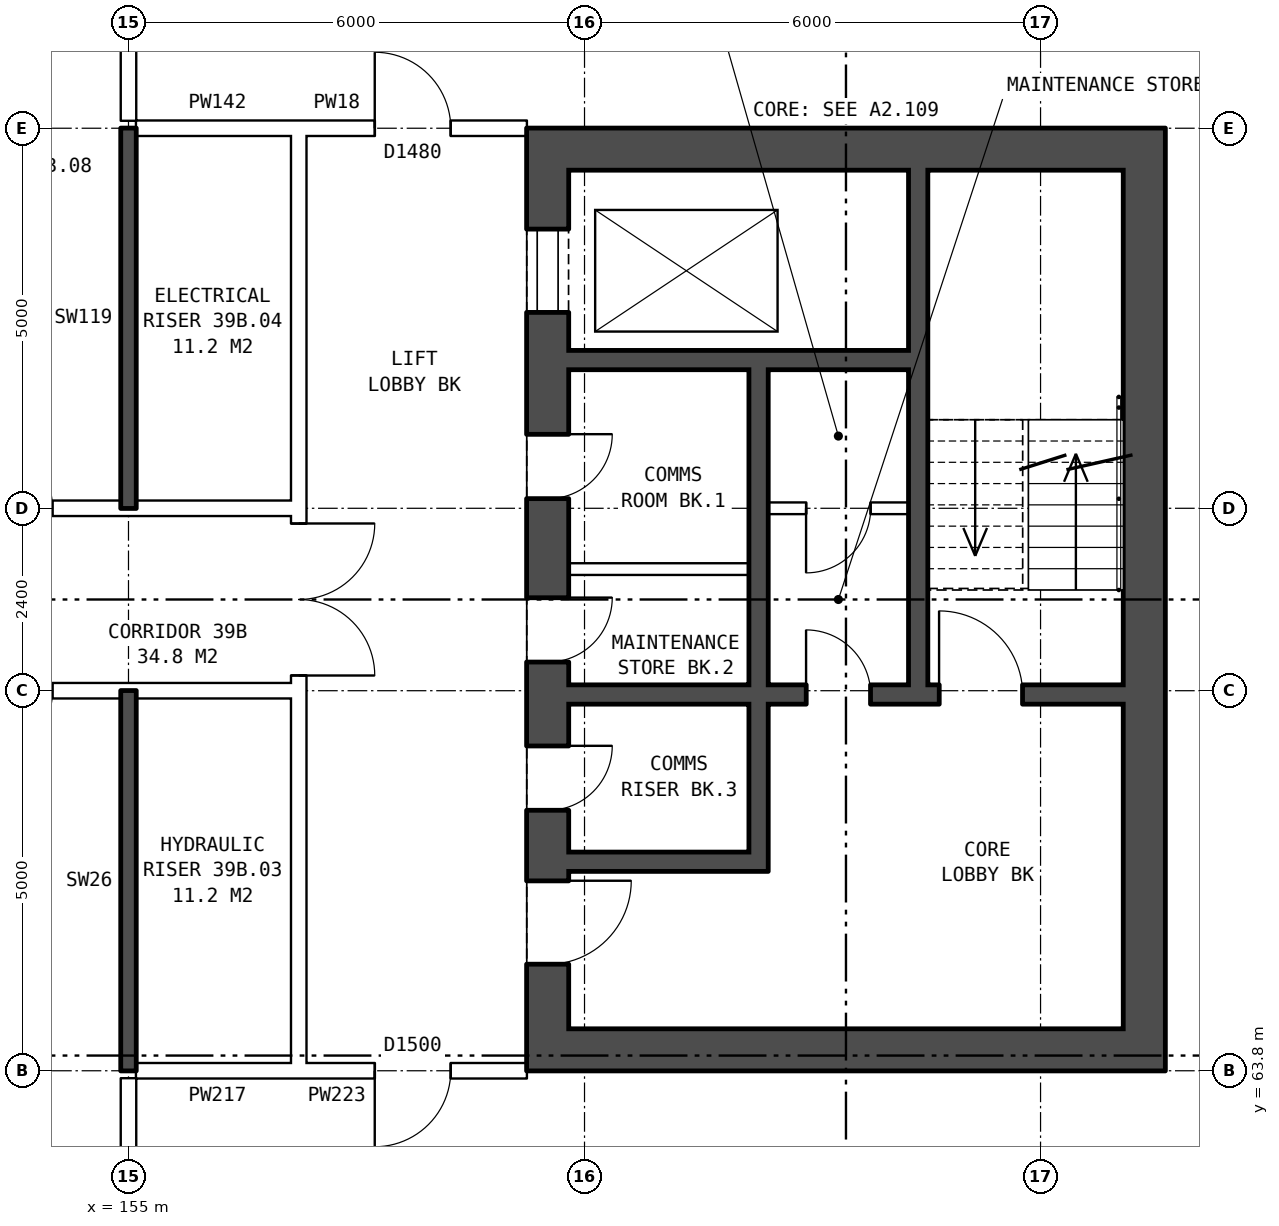
"""IFC4 building model, lengths in metres.
Left out: names, types, materials, properties, quantities, classifications, styles, units other than length and angle.
Written with IfcOpenShell. Run it as: python <this file> out.ifc"""

import sys

from ifc_helpers import new_model, si_unit, direction, frame, frame_2d, origin, place, context, subcontext, project, spatial, rectangle, extrude, element, fill, save


model = new_model("IFC4")
c1 = context("Model", 3, precision=1e-05, world=origin(), true_north=direction((0.0, 1.0)))
c2 = subcontext(c1, "Body", "Model", "MODEL_VIEW")
j1 = project(units=[si_unit("LENGTHUNIT", "METRE"), si_unit("PLANEANGLEUNIT", "RADIAN")], contexts=[c1])
p1 = place(None, origin())
s1 = spatial("IfcSite", under=j1, at=p1, CompositionType="ELEMENT")
p2 = place(p1, origin())
s2 = spatial("IfcBuilding", under=s1, at=p2, CompositionType="ELEMENT")
p3 = place(p2, frame((0.0, 0.0, 139.2)))
s3 = spatial("IfcBuildingStorey", under=s2, at=p3, CompositionType="ELEMENT", Elevation=139.2)
p4 = place(p3, frame((160.515, 76.2, 0.0), z_axis=(0.0, 0.0, 1.0), x_axis=(0.0, -1.0, 0.0)))
e1 = element("IfcWall", 1, at=p4, inside=s3, PredefinedType="SHEAR", context=c2, shape_type="SweptSolid", body=[
    extrude(rectangle(XDim=12.4, YDim=0.55, at=frame_2d((6.2, 0.0))), origin(), (0.0, 0.0, 1.0), 2.85),
])
p5 = place(p4, frame((1.325, 0.0, 0.0)))
e2 = element("IfcOpeningElement", 2, at=p5, cuts=e1, PredefinedType="OPENING", context=c2, shape_type="SweptSolid", body=[
    extrude(rectangle(XDim=1.1, YDim=2.1, at=frame_2d((0.55, 1.05))), frame((0.0, 0.285, 0.0), z_axis=(0.0, -1.0, 0.0), x_axis=(1.0, 0.0, 0.0)), (0.0, 0.0, 1.0), 0.57),
])
p6 = place(p4, frame((4.025, 0.0, 0.0)))
e3 = element("IfcOpeningElement", 3, at=p6, cuts=e1, PredefinedType="OPENING", context=c2, shape_type="SweptSolid", body=[
    extrude(rectangle(XDim=0.85, YDim=2.1, at=frame_2d((0.425, 1.05))), frame((0.0, 0.285, 0.0), z_axis=(0.0, -1.0, 0.0), x_axis=(1.0, 0.0, 0.0)), (0.0, 0.0, 1.0), 0.57),
])
p7 = place(p4, frame((6.175, 0.0, 0.0)))
e4 = element("IfcOpeningElement", 4, at=p7, cuts=e1, PredefinedType="OPENING", context=c2, shape_type="SweptSolid", body=[
    extrude(rectangle(XDim=0.85, YDim=2.1, at=frame_2d((0.425, 1.05))), frame((0.0, 0.285, 0.0), z_axis=(0.0, -1.0, 0.0), x_axis=(1.0, 0.0, 0.0)), (0.0, 0.0, 1.0), 0.57),
])
p8 = place(p4, frame((9.9, 0.0, 0.0)))
e5 = element("IfcOpeningElement", 5, at=p8, cuts=e1, PredefinedType="OPENING", context=c2, shape_type="SweptSolid", body=[
    extrude(rectangle(XDim=1.1, YDim=2.1, at=frame_2d((0.55, 1.05))), frame((0.0, 0.285, 0.0), z_axis=(0.0, -1.0, 0.0), x_axis=(1.0, 0.0, 0.0)), (0.0, 0.0, 1.0), 0.57),
])
p9 = place(p4, frame((8.125, 0.0, 0.0)))
e6 = element("IfcOpeningElement", 6, at=p9, cuts=e1, PredefinedType="OPENING", context=c2, shape_type="SweptSolid", body=[
    extrude(rectangle(XDim=0.85, YDim=2.1, at=frame_2d((0.425, 1.05))), frame((0.0, 0.285, 0.0), z_axis=(0.0, -1.0, 0.0), x_axis=(1.0, 0.0, 0.0)), (0.0, 0.0, 1.0), 0.57),
])
p10 = place(p3, frame((168.365, 76.2, 0.0), z_axis=(0.0, 0.0, 1.0), x_axis=(0.0, -1.0, 0.0)))
e7 = element("IfcWall", 7, at=p10, inside=s3, PredefinedType="SHEAR", context=c2, shape_type="SweptSolid", body=[
    extrude(rectangle(XDim=12.4, YDim=0.55, at=frame_2d((6.2, 0.0))), origin(), (0.0, 0.0, 1.0), 2.85),
])
for number, where, z_axis, x_axis in (
    (8, (160.79, 75.925, 0.0), (0.0, 0.0, 1.0), (1.0, 0.0, 0.0)),
    (9, (160.79, 64.075, 0.0), (0.0, 0.0, 1.0), (1.0, 0.0, 0.0)),
):
    element("IfcWall", number, at=place(p3, frame(where, z_axis=z_axis, x_axis=x_axis)), inside=s3, PredefinedType="SHEAR", context=c2, shape_type="SweptSolid", body=[
        extrude(rectangle(XDim=7.3, YDim=0.55, at=frame_2d((3.65, 0.0))), origin(), (0.0, 0.0, 1.0), 2.85),
    ])
p11 = place(p3, frame((160.79, 73.15, 0.0), z_axis=(0.0, 0.0, 1.0), x_axis=(1.0, 0.0, 0.0)))
e10 = element("IfcWall", 10, at=p11, inside=s3, PredefinedType="SHEAR", context=c2, shape_type="SweptSolid", body=[
    extrude(rectangle(XDim=4.475, YDim=0.25, at=frame_2d((2.237, 0.0))), origin(), (0.0, 0.0, 1.0), 2.85),
])
p12 = place(p3, frame((163.415, 71.2, 0.0), z_axis=(0.0, 0.0, 1.0), x_axis=(1.0, 0.0, 0.0)))
e11 = element("IfcWall", 11, at=p12, inside=s3, PredefinedType="PARTITIONING", context=c2, shape_type="SweptSolid", body=[
    extrude(rectangle(XDim=1.85, YDim=0.15, at=frame_2d((0.925, 0.0))), origin(), (0.0, 0.0, 1.0), 2.85),
])
p13 = place(p12, frame((0.5, 0.0, 0.0)))
e12 = element("IfcOpeningElement", 12, at=p13, cuts=e11, PredefinedType="OPENING", context=c2, shape_type="SweptSolid", body=[
    extrude(rectangle(XDim=0.85, YDim=2.1, at=frame_2d((0.425, 1.05))), frame((0.0, 0.085, 0.0), z_axis=(0.0, -1.0, 0.0), x_axis=(1.0, 0.0, 0.0)), (0.0, 0.0, 1.0), 0.17),
])
p14 = place(p3, frame((160.79, 70.4, 0.0), z_axis=(0.0, 0.0, 1.0), x_axis=(1.0, 0.0, 0.0)))
e13 = element("IfcWall", 13, at=p14, inside=s3, PredefinedType="PARTITIONING", context=c2, shape_type="SweptSolid", body=[
    extrude(rectangle(XDim=2.375, YDim=0.15, at=frame_2d((1.188, 0.0))), origin(), (0.0, 0.0, 1.0), 2.85),
])
p15 = place(p3, frame((160.79, 68.75, 0.0), z_axis=(0.0, 0.0, 1.0), x_axis=(1.0, 0.0, 0.0)))
e14 = element("IfcWall", 14, at=p15, inside=s3, PredefinedType="SHEAR", context=c2, shape_type="SweptSolid", body=[
    extrude(rectangle(XDim=7.3, YDim=0.25, at=frame_2d((3.65, 0.0))), origin(), (0.0, 0.0, 1.0), 2.85),
])
p16 = place(p15, frame((4.875, 0.0, 0.0)))
e15 = element("IfcOpeningElement", 15, at=p16, cuts=e14, PredefinedType="OPENING", context=c2, shape_type="SweptSolid", body=[
    extrude(rectangle(XDim=1.1, YDim=2.1, at=frame_2d((0.55, 1.05))), frame((0.0, 0.135, 0.0), z_axis=(0.0, -1.0, 0.0), x_axis=(1.0, 0.0, 0.0)), (0.0, 0.0, 1.0), 0.27),
])
p17 = place(p15, frame((3.125, 0.0, 0.0)))
e16 = element("IfcOpeningElement", 16, at=p17, cuts=e14, PredefinedType="OPENING", context=c2, shape_type="SweptSolid", body=[
    extrude(rectangle(XDim=0.85, YDim=2.1, at=frame_2d((0.425, 1.05))), frame((0.0, 0.135, 0.0), z_axis=(0.0, -1.0, 0.0), x_axis=(1.0, 0.0, 0.0)), (0.0, 0.0, 1.0), 0.27),
])
p18 = place(p3, frame((160.79, 66.55, 0.0), z_axis=(0.0, 0.0, 1.0), x_axis=(1.0, 0.0, 0.0)))
e17 = element("IfcWall", 17, at=p18, inside=s3, PredefinedType="SHEAR", context=c2, shape_type="SweptSolid", body=[
    extrude(rectangle(XDim=2.375, YDim=0.25, at=frame_2d((1.188, 0.0))), origin(), (0.0, 0.0, 1.0), 2.85),
])
p19 = place(p3, frame((163.29, 73.025, 0.0), z_axis=(0.0, 0.0, 1.0), x_axis=(0.0, -1.0, 0.0)))
e18 = element("IfcWall", 18, at=p19, inside=s3, PredefinedType="SHEAR", context=c2, shape_type="SweptSolid", body=[
    extrude(rectangle(XDim=4.15, YDim=0.25, at=frame_2d((2.075, 0.0))), origin(), (0.0, 0.0, 1.0), 2.85),
])
p20 = place(p3, frame((163.29, 68.625, 0.0), z_axis=(0.0, 0.0, 1.0), x_axis=(0.0, -1.0, 0.0)))
e19 = element("IfcWall", 19, at=p20, inside=s3, PredefinedType="SHEAR", context=c2, shape_type="SweptSolid", body=[
    extrude(rectangle(XDim=2.2, YDim=0.25, at=frame_2d((1.1, 0.0))), origin(), (0.0, 0.0, 1.0), 2.85),
])
p21 = place(p3, frame((165.39, 75.65, 0.0), z_axis=(0.0, 0.0, 1.0), x_axis=(0.0, -1.0, 0.0)))
e20 = element("IfcWall", 20, at=p21, inside=s3, PredefinedType="SHEAR", context=c2, shape_type="SweptSolid", body=[
    extrude(rectangle(XDim=6.775, YDim=0.25, at=frame_2d((3.387, 0.0))), origin(), (0.0, 0.0, 1.0), 2.85),
])
p22 = place(p3, frame((157.24, 63.9, 0.0), z_axis=(0.0, 0.0, 1.0), x_axis=(0.0, 1.0, 0.0)))
e21 = element("IfcWall", 21, at=p22, inside=s3, PredefinedType="PARTITIONING", context=c2, shape_type="SweptSolid", body=[
    extrude(rectangle(XDim=12.2, YDim=0.2, at=frame_2d((6.1, 0.0))), origin(), (0.0, 0.0, 1.0), 2.85),
])
p23 = place(p22, frame((5.1, 0.0, 0.0)))
e22 = element("IfcOpeningElement", 22, at=p23, cuts=e21, PredefinedType="OPENING", context=c2, shape_type="SweptSolid", body=[
    extrude(rectangle(XDim=2.0, YDim=2.1, at=frame_2d((1.0, 1.05))), frame((0.0, 0.11, 0.0), z_axis=(0.0, -1.0, 0.0), x_axis=(1.0, 0.0, 0.0)), (0.0, 0.0, 1.0), 0.22),
])
p24 = place(p3, frame((155.1, 63.8, 0.0), z_axis=(0.0, 0.0, 1.0), x_axis=(1.0, 0.0, 0.0)))
e23 = element("IfcWall", 23, at=p24, inside=s3, PredefinedType="PARTITIONING", context=c2, shape_type="SweptSolid", body=[
    extrude(rectangle(XDim=2.14, YDim=0.2, at=frame_2d((1.07, 0.0))), origin(), (0.0, 0.0, 1.0), 2.85),
])
p25 = place(p3, frame((157.24, 63.8, 0.0), z_axis=(0.0, 0.0, 1.0), x_axis=(1.0, 0.0, 0.0)))
e24 = element("IfcWall", 24, at=p25, inside=s3, PredefinedType="PARTITIONING", context=c2, shape_type="SweptSolid", body=[
    extrude(rectangle(XDim=3.0, YDim=0.2, at=frame_2d((1.5, 0.0))), origin(), (0.0, 0.0, 1.0), 2.85),
])
p26 = place(p25, frame((1.0, 0.0, 0.0)))
e25 = element("IfcOpeningElement", 25, at=p26, cuts=e24, PredefinedType="OPENING", context=c2, shape_type="SweptSolid", body=[
    extrude(rectangle(XDim=1.0, YDim=2.1, at=frame_2d((0.5, 1.05))), frame((0.0, 0.11, 0.0), z_axis=(0.0, -1.0, 0.0), x_axis=(1.0, 0.0, 0.0)), (0.0, 0.0, 1.0), 0.22),
])
p27 = place(p3, frame((142.76, 68.8, 0.0), z_axis=(0.0, 0.0, 1.0), x_axis=(1.0, 0.0, 0.0)))
e26 = element("IfcWall", 26, at=p27, inside=s3, PredefinedType="PARTITIONING", context=c2, shape_type="SweptSolid", body=[
    extrude(rectangle(XDim=14.48, YDim=0.2, at=frame_2d((7.24, 0.0))), origin(), (0.0, 0.0, 1.0), 2.85),
])
p28 = place(p27, frame((4.24, 0.0, 0.0)))
e27 = element("IfcOpeningElement", 27, at=p28, cuts=e26, PredefinedType="OPENING", context=c2, shape_type="SweptSolid", body=[
    extrude(rectangle(XDim=1.0, YDim=2.1, at=frame_2d((0.5, 1.05))), frame((0.0, 0.11, 0.0), z_axis=(0.0, -1.0, 0.0), x_axis=(1.0, 0.0, 0.0)), (0.0, 0.0, 1.0), 0.22),
])
p29 = place(p27, frame((10.24, 0.0, 0.0)))
e28 = element("IfcOpeningElement", 28, at=p29, cuts=e26, PredefinedType="OPENING", context=c2, shape_type="SweptSolid", body=[
    extrude(rectangle(XDim=1.0, YDim=2.1, at=frame_2d((0.5, 1.05))), frame((0.0, 0.11, 0.0), z_axis=(0.0, -1.0, 0.0), x_axis=(1.0, 0.0, 0.0)), (0.0, 0.0, 1.0), 0.22),
])
p30 = place(p3, frame((142.76, 71.2, 0.0), z_axis=(0.0, 0.0, 1.0), x_axis=(1.0, 0.0, 0.0)))
e29 = element("IfcWall", 29, at=p30, inside=s3, PredefinedType="PARTITIONING", context=c2, shape_type="SweptSolid", body=[
    extrude(rectangle(XDim=14.48, YDim=0.2, at=frame_2d((7.24, 0.0))), origin(), (0.0, 0.0, 1.0), 2.85),
])
p31 = place(p30, frame((1.12, 0.0, 0.0)))
e30 = element("IfcOpeningElement", 30, at=p31, cuts=e29, PredefinedType="OPENING", context=c2, shape_type="SweptSolid", body=[
    extrude(rectangle(XDim=1.0, YDim=2.1, at=frame_2d((0.5, 1.05))), frame((0.0, 0.11, 0.0), z_axis=(0.0, -1.0, 0.0), x_axis=(1.0, 0.0, 0.0)), (0.0, 0.0, 1.0), 0.22),
])
p32 = place(p30, frame((10.24, 0.0, 0.0)))
e31 = element("IfcOpeningElement", 31, at=p32, cuts=e29, PredefinedType="OPENING", context=c2, shape_type="SweptSolid", body=[
    extrude(rectangle(XDim=1.0, YDim=2.1, at=frame_2d((0.5, 1.05))), frame((0.0, 0.11, 0.0), z_axis=(0.0, -1.0, 0.0), x_axis=(1.0, 0.0, 0.0)), (0.0, 0.0, 1.0), 0.22),
])
p33 = place(p3, frame((155.1, 76.2, 0.0), z_axis=(0.0, 0.0, 1.0), x_axis=(1.0, 0.0, 0.0)))
e32 = element("IfcWall", 32, at=p33, inside=s3, PredefinedType="PARTITIONING", context=c2, shape_type="SweptSolid", body=[
    extrude(rectangle(XDim=2.14, YDim=0.2, at=frame_2d((1.07, 0.0))), origin(), (0.0, 0.0, 1.0), 2.85),
])
p34 = place(p3, frame((157.24, 76.2, 0.0), z_axis=(0.0, 0.0, 1.0), x_axis=(1.0, 0.0, 0.0)))
e33 = element("IfcWall", 33, at=p34, inside=s3, PredefinedType="PARTITIONING", context=c2, shape_type="SweptSolid", body=[
    extrude(rectangle(XDim=3.0, YDim=0.2, at=frame_2d((1.5, 0.0))), origin(), (0.0, 0.0, 1.0), 2.85),
])
p35 = place(p34, frame((1.0, 0.0, 0.0)))
e34 = element("IfcOpeningElement", 34, at=p35, cuts=e33, PredefinedType="OPENING", context=c2, shape_type="SweptSolid", body=[
    extrude(rectangle(XDim=1.0, YDim=2.1, at=frame_2d((0.5, 1.05))), frame((0.0, 0.11, 0.0), z_axis=(0.0, -1.0, 0.0), x_axis=(1.0, 0.0, 0.0)), (0.0, 0.0, 1.0), 0.22),
])
p36 = place(p3, frame((155.0, 61.5, 0.0), z_axis=(0.0, 0.0, 1.0), x_axis=(0.0, 1.0, 0.0)))
e35 = element("IfcWall", 35, at=p36, inside=s3, PredefinedType="PARTITIONING", context=c2, shape_type="SweptSolid", body=[
    extrude(rectangle(XDim=2.2, YDim=0.2, at=frame_2d((1.1, 0.0))), origin(), (0.0, 0.0, 1.0), 2.85),
])
for number, where, z_axis, x_axis in (
    (36, (155.0, 63.8, 0.0), (0.0, 0.0, 1.0), (0.0, 1.0, 0.0)),
    (37, (155.0, 71.2, 0.0), (0.0, 0.0, 1.0), (0.0, 1.0, 0.0)),
):
    element("IfcWall", number, at=place(p3, frame(where, z_axis=z_axis, x_axis=x_axis)), inside=s3, PredefinedType="SOLIDWALL", context=c2, shape_type="SweptSolid", body=[
        extrude(rectangle(XDim=5.0, YDim=0.2, at=frame_2d((2.5, 0.0))), origin(), (0.0, 0.0, 1.0), 2.85),
    ])
p37 = place(p3, frame((155.0, 76.3, 0.0), z_axis=(0.0, 0.0, 1.0), x_axis=(0.0, 1.0, 0.0)))
e38 = element("IfcWall", 38, at=p37, inside=s3, PredefinedType="PARTITIONING", context=c2, shape_type="SweptSolid", body=[
    extrude(rectangle(XDim=2.2, YDim=0.2, at=frame_2d((1.1, 0.0))), origin(), (0.0, 0.0, 1.0), 2.85),
])
p38 = place(p5, origin())
e39 = element("IfcDoor", 39, at=p38, inside=s3, OperationType="DOUBLE_DOOR_SLIDING", PredefinedType="DOOR", context=c2, shape_type="SweptSolid", body=[
    extrude(rectangle(XDim=1.1, YDim=2.1, at=frame_2d((0.55, 1.05))), frame((0.0, 0.26, 0.0), z_axis=(0.0, -1.0, 0.0), x_axis=(1.0, 0.0, 0.0)), (0.0, 0.0, 1.0), 0.05),
])
fill(e2, e39)
p39 = place(p6, origin())
e40 = element("IfcDoor", 40, at=p39, inside=s3, OperationType="SINGLE_SWING_LEFT", PredefinedType="DOOR", context=c2, shape_type="SweptSolid", body=[
    extrude(rectangle(XDim=0.85, YDim=2.1, at=frame_2d((0.425, 1.05))), frame((0.0, 0.26, 0.0), z_axis=(0.0, -1.0, 0.0), x_axis=(1.0, 0.0, 0.0)), (0.0, 0.0, 1.0), 0.05),
])
fill(e3, e40)
p40 = place(p7, origin())
e41 = element("IfcDoor", 41, at=p40, inside=s3, OperationType="SINGLE_SWING_LEFT", PredefinedType="DOOR", context=c2, shape_type="SweptSolid", body=[
    extrude(rectangle(XDim=0.85, YDim=2.1, at=frame_2d((0.425, 1.05))), frame((0.0, 0.26, 0.0), z_axis=(0.0, -1.0, 0.0), x_axis=(1.0, 0.0, 0.0)), (0.0, 0.0, 1.0), 0.05),
])
fill(e4, e41)
p41 = place(p8, origin())
e42 = element("IfcDoor", 42, at=p41, inside=s3, OperationType="SINGLE_SWING_LEFT", PredefinedType="DOOR", context=c2, shape_type="SweptSolid", body=[
    extrude(rectangle(XDim=1.1, YDim=2.1, at=frame_2d((0.55, 1.05))), frame((0.0, 0.26, 0.0), z_axis=(0.0, -1.0, 0.0), x_axis=(1.0, 0.0, 0.0)), (0.0, 0.0, 1.0), 0.05),
])
fill(e5, e42)
p42 = place(p16, origin())
e43 = element("IfcDoor", 43, at=p42, inside=s3, OperationType="SINGLE_SWING_LEFT", PredefinedType="DOOR", context=c2, shape_type="SweptSolid", body=[
    extrude(rectangle(XDim=1.1, YDim=2.1, at=frame_2d((0.55, 1.05))), frame((0.0, 0.025, 0.0), z_axis=(0.0, -1.0, 0.0), x_axis=(1.0, 0.0, 0.0)), (0.0, 0.0, 1.0), 0.05),
])
fill(e15, e43)
p43 = place(p9, origin())
e44 = element("IfcDoor", 44, at=p43, inside=s3, OperationType="SINGLE_SWING_LEFT", PredefinedType="DOOR", context=c2, shape_type="SweptSolid", body=[
    extrude(rectangle(XDim=0.85, YDim=2.1, at=frame_2d((0.425, 1.05))), frame((0.0, 0.26, 0.0), z_axis=(0.0, -1.0, 0.0), x_axis=(1.0, 0.0, 0.0)), (0.0, 0.0, 1.0), 0.05),
])
fill(e6, e44)
p44 = place(p17, origin())
e45 = element("IfcDoor", 45, at=p44, inside=s3, OperationType="SINGLE_SWING_LEFT", PredefinedType="DOOR", context=c2, shape_type="SweptSolid", body=[
    extrude(rectangle(XDim=0.85, YDim=2.1, at=frame_2d((0.425, 1.05))), frame((0.0, 0.025, 0.0), z_axis=(0.0, -1.0, 0.0), x_axis=(1.0, 0.0, 0.0)), (0.0, 0.0, 1.0), 0.05),
])
fill(e16, e45)
p45 = place(p13, frame((0.85, 0.0, 0.0), z_axis=(0.0, 0.0, 1.0), x_axis=(-1.0, 0.0, 0.0)))
e46 = element("IfcDoor", 46, at=p45, inside=s3, OperationType="SINGLE_SWING_RIGHT", PredefinedType="DOOR", context=c2, shape_type="SweptSolid", body=[
    extrude(rectangle(XDim=0.85, YDim=2.1, at=frame_2d((0.425, 1.05))), frame((0.0, 0.025, 0.0), z_axis=(0.0, -1.0, 0.0), x_axis=(1.0, 0.0, 0.0)), (0.0, 0.0, 1.0), 0.05),
])
fill(e12, e46)
p46 = place(p23, frame((2.0, 0.0, 0.0), z_axis=(0.0, 0.0, 1.0), x_axis=(-1.0, 0.0, 0.0)))
e47 = element("IfcDoor", 47, at=p46, inside=s3, OperationType="DOUBLE_DOOR_SINGLE_SWING", PredefinedType="DOOR", context=c2, shape_type="SweptSolid", body=[
    extrude(rectangle(XDim=2.0, YDim=2.1, at=frame_2d((1.0, 1.05))), frame((0.0, 0.025, 0.0), z_axis=(0.0, -1.0, 0.0), x_axis=(1.0, 0.0, 0.0)), (0.0, 0.0, 1.0), 0.05),
])
fill(e22, e47)
p47 = place(p26, frame((1.0, 0.0, 0.0), z_axis=(0.0, 0.0, 1.0), x_axis=(-1.0, 0.0, 0.0)))
e48 = element("IfcDoor", 48, at=p47, inside=s3, OperationType="SINGLE_SWING_RIGHT", PredefinedType="DOOR", context=c2, shape_type="SweptSolid", body=[
    extrude(rectangle(XDim=1.0, YDim=2.1, at=frame_2d((0.5, 1.05))), frame((0.0, 0.025, 0.0), z_axis=(0.0, -1.0, 0.0), x_axis=(1.0, 0.0, 0.0)), (0.0, 0.0, 1.0), 0.05),
])
fill(e25, e48)
p48 = place(p35, origin())
e49 = element("IfcDoor", 49, at=p48, inside=s3, OperationType="SINGLE_SWING_LEFT", PredefinedType="DOOR", context=c2, shape_type="SweptSolid", body=[
    extrude(rectangle(XDim=1.0, YDim=2.1, at=frame_2d((0.5, 1.05))), frame((0.0, 0.025, 0.0), z_axis=(0.0, -1.0, 0.0), x_axis=(1.0, 0.0, 0.0)), (0.0, 0.0, 1.0), 0.05),
])
fill(e34, e49)
save(model, sys.argv[1])
